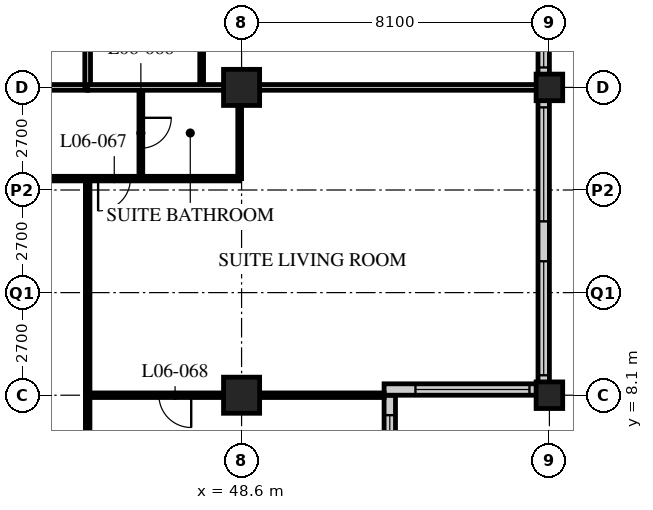
"""IFC4 building model, lengths in metres.
Left out: names, types, materials, properties, quantities, classifications, styles, units other than length and angle.
Written with IfcOpenShell. Run it as: python <this file> out.ifc"""

import sys

from ifc_helpers import new_model, si_unit, direction, frame, frame_2d, origin, origin_2d, place, context, subcontext, project, spatial, rectangle, hollow_rectangle, extrude, element, fill, save


model = new_model("IFC4")
c1 = context("Model", 3, precision=1e-05, world=origin(), true_north=direction((0.0, 1.0)))
c2 = subcontext(c1, "Body", "Model", "MODEL_VIEW")
j1 = project(units=[si_unit("LENGTHUNIT", "METRE"), si_unit("PLANEANGLEUNIT", "RADIAN")], contexts=[c1])
p1 = place(None, origin())
s1 = spatial("IfcSite", under=j1, at=p1, CompositionType="ELEMENT")
p2 = place(p1, origin())
s2 = spatial("IfcBuilding", under=s1, at=p2, CompositionType="ELEMENT")
p3 = place(p2, frame((0.0, 0.0, 33.0)))
s3 = spatial("IfcBuildingStorey", under=s2, at=p3, CompositionType="ELEMENT", Elevation=33.0)
for number, where, z_axis, x_axis in (
    (1, (48.6, 8.1, 0.0), (0.0, 0.0, 1.0), (1.0, 0.0, 0.0)),
    (2, (48.6, 16.2, 0.0), (0.0, 0.0, 1.0), (1.0, 0.0, 0.0)),
):
    element("IfcColumn", number, at=place(p3, frame(where, z_axis=z_axis, x_axis=x_axis)), inside=s3, PredefinedType="COLUMN", context=c2, shape_type="SweptSolid", body=[
        extrude(hollow_rectangle(XDim=0.95, YDim=0.95, WallThickness=0.095, at=origin_2d()), origin(), (0.0, 0.0, 1.0), 3.4),
    ])
for number, where, z_axis, x_axis in (
    (3, (56.7, 8.1, 0.0), (0.0, 0.0, 1.0), (1.0, 0.0, 0.0)),
    (4, (56.7, 16.2, 0.0), (0.0, 0.0, 1.0), (1.0, 0.0, 0.0)),
):
    element("IfcColumn", number, at=place(p3, frame(where, z_axis=z_axis, x_axis=x_axis)), inside=s3, PredefinedType="COLUMN", context=c2, shape_type="SweptSolid", body=[
        extrude(hollow_rectangle(XDim=0.7, YDim=0.7, WallThickness=0.06, at=origin_2d()), origin(), (0.0, 0.0, 1.0), 3.4),
    ])
p4 = place(p3, frame((52.5, 4.35, 0.0), z_axis=(0.0, 0.0, 1.0), x_axis=(0.0, 1.0, 0.0)))
e5 = element("IfcWall", 5, at=p4, inside=s3, PredefinedType="SOLIDWALL", context=c2, shape_type="SweptSolid", body=[
    extrude(rectangle(XDim=3.75, YDim=0.3, at=frame_2d((1.875, 0.0))), origin(), (0.0, 0.0, 1.0), 3.19),
])
p5 = place(p4, frame((0.225, 0.0, 0.9)))
e6 = element("IfcOpeningElement", 6, at=p5, cuts=e5, PredefinedType="OPENING", context=c2, shape_type="SweptSolid", body=[
    extrude(rectangle(XDim=3.0, YDim=1.5, at=frame_2d((1.5, 0.75))), frame((0.0, 0.16, 0.0), z_axis=(0.0, -1.0, 0.0), x_axis=(1.0, 0.0, 0.0)), (0.0, 0.0, 1.0), 0.32),
])
p6 = place(p3, frame((52.35, 8.25, 0.0), z_axis=(0.0, 0.0, 1.0), x_axis=(1.0, 0.0, 0.0)))
e7 = element("IfcWall", 7, at=p6, inside=s3, PredefinedType="SOLIDWALL", context=c2, shape_type="SweptSolid", body=[
    extrude(rectangle(XDim=4.35, YDim=0.3, at=frame_2d((2.175, 0.0))), origin(), (0.0, 0.0, 1.0), 3.19),
])
p7 = place(p6, frame((0.825, 0.0, 0.9)))
e8 = element("IfcOpeningElement", 8, at=p7, cuts=e7, PredefinedType="OPENING", context=c2, shape_type="SweptSolid", body=[
    extrude(rectangle(XDim=3.0, YDim=1.5, at=frame_2d((1.5, 0.75))), frame((0.0, 0.16, 0.0), z_axis=(0.0, -1.0, 0.0), x_axis=(1.0, 0.0, 0.0)), (0.0, 0.0, 1.0), 0.32),
])
p8 = place(p3, frame((56.55, 8.4, 0.0), z_axis=(0.0, 0.0, 1.0), x_axis=(0.0, 1.0, 0.0)))
e9 = element("IfcWall", 9, at=p8, inside=s3, PredefinedType="SOLIDWALL", context=c2, shape_type="SweptSolid", body=[
    extrude(rectangle(XDim=32.1, YDim=0.3, at=frame_2d((16.05, 0.0))), origin(), (0.0, 0.0, 1.0), 3.19),
])
p9 = place(p8, frame((0.225, 0.0, 0.9)))
e10 = element("IfcOpeningElement", 10, at=p9, cuts=e9, PredefinedType="OPENING", context=c2, shape_type="SweptSolid", body=[
    extrude(rectangle(XDim=3.0, YDim=2.0, at=frame_2d((1.5, 1.0))), frame((0.0, 0.16, 0.0), z_axis=(0.0, -1.0, 0.0), x_axis=(1.0, 0.0, 0.0)), (0.0, 0.0, 1.0), 0.32),
])
p10 = place(p8, frame((4.275, 0.0, 0.9)))
e11 = element("IfcOpeningElement", 11, at=p10, cuts=e9, PredefinedType="OPENING", context=c2, shape_type="SweptSolid", body=[
    extrude(rectangle(XDim=3.0, YDim=2.0, at=frame_2d((1.5, 1.0))), frame((0.0, 0.16, 0.0), z_axis=(0.0, -1.0, 0.0), x_axis=(1.0, 0.0, 0.0)), (0.0, 0.0, 1.0), 0.32),
])
p11 = place(p8, frame((8.325, 0.0, 0.9)))
e12 = element("IfcOpeningElement", 12, at=p11, cuts=e9, PredefinedType="OPENING", context=c2, shape_type="SweptSolid", body=[
    extrude(rectangle(XDim=3.0, YDim=2.0, at=frame_2d((1.5, 1.0))), frame((0.0, 0.16, 0.0), z_axis=(0.0, -1.0, 0.0), x_axis=(1.0, 0.0, 0.0)), (0.0, 0.0, 1.0), 0.32),
])
p12 = place(p8, frame((12.375, 0.0, 0.9)))
e13 = element("IfcOpeningElement", 13, at=p12, cuts=e9, PredefinedType="OPENING", context=c2, shape_type="SweptSolid", body=[
    extrude(rectangle(XDim=3.0, YDim=2.0, at=frame_2d((1.5, 1.0))), frame((0.0, 0.16, 0.0), z_axis=(0.0, -1.0, 0.0), x_axis=(1.0, 0.0, 0.0)), (0.0, 0.0, 1.0), 0.32),
])
p13 = place(p8, frame((16.425, 0.0, 0.9)))
e14 = element("IfcOpeningElement", 14, at=p13, cuts=e9, PredefinedType="OPENING", context=c2, shape_type="SweptSolid", body=[
    extrude(rectangle(XDim=3.0, YDim=2.0, at=frame_2d((1.5, 1.0))), frame((0.0, 0.16, 0.0), z_axis=(0.0, -1.0, 0.0), x_axis=(1.0, 0.0, 0.0)), (0.0, 0.0, 1.0), 0.32),
])
p14 = place(p8, frame((20.475, 0.0, 0.9)))
e15 = element("IfcOpeningElement", 15, at=p14, cuts=e9, PredefinedType="OPENING", context=c2, shape_type="SweptSolid", body=[
    extrude(rectangle(XDim=3.0, YDim=2.0, at=frame_2d((1.5, 1.0))), frame((0.0, 0.16, 0.0), z_axis=(0.0, -1.0, 0.0), x_axis=(1.0, 0.0, 0.0)), (0.0, 0.0, 1.0), 0.32),
])
p15 = place(p8, frame((24.525, 0.0, 0.9)))
e16 = element("IfcOpeningElement", 16, at=p15, cuts=e9, PredefinedType="OPENING", context=c2, shape_type="SweptSolid", body=[
    extrude(rectangle(XDim=3.0, YDim=2.0, at=frame_2d((1.5, 1.0))), frame((0.0, 0.16, 0.0), z_axis=(0.0, -1.0, 0.0), x_axis=(1.0, 0.0, 0.0)), (0.0, 0.0, 1.0), 0.32),
])
p16 = place(p8, frame((28.575, 0.0, 0.9)))
e17 = element("IfcOpeningElement", 17, at=p16, cuts=e9, PredefinedType="OPENING", context=c2, shape_type="SweptSolid", body=[
    extrude(rectangle(XDim=3.0, YDim=2.0, at=frame_2d((1.5, 1.0))), frame((0.0, 0.16, 0.0), z_axis=(0.0, -1.0, 0.0), x_axis=(1.0, 0.0, 0.0)), (0.0, 0.0, 1.0), 0.32),
])
p17 = place(p3, frame((12.15, 16.2, 0.0), z_axis=(0.0, 0.0, 1.0), x_axis=(1.0, 0.0, 0.0)))
e18 = element("IfcWall", 18, at=p17, inside=s3, PredefinedType="PARTITIONING", context=c2, shape_type="SweptSolid", body=[
    extrude(rectangle(XDim=32.4, YDim=0.15, at=frame_2d((16.2, 0.0))), origin(), (0.0, 0.0, 1.0), 2.578),
])
p18 = place(p17, frame((6.5, 0.0, 0.0)))
e19 = element("IfcOpeningElement", 19, at=p18, cuts=e18, PredefinedType="OPENING", context=c2, shape_type="SweptSolid", body=[
    extrude(rectangle(XDim=1.0, YDim=2.1, at=frame_2d((0.5, 1.05))), frame((0.0, 0.085, 0.0), z_axis=(0.0, -1.0, 0.0), x_axis=(1.0, 0.0, 0.0)), (0.0, 0.0, 1.0), 0.17),
])
p19 = place(p17, frame((8.4, 0.0, 0.0)))
e20 = element("IfcOpeningElement", 20, at=p19, cuts=e18, PredefinedType="OPENING", context=c2, shape_type="SweptSolid", body=[
    extrude(rectangle(XDim=1.0, YDim=2.1, at=frame_2d((0.5, 1.05))), frame((0.0, 0.085, 0.0), z_axis=(0.0, -1.0, 0.0), x_axis=(1.0, 0.0, 0.0)), (0.0, 0.0, 1.0), 0.17),
])
p20 = place(p17, frame((14.6, 0.0, 0.0)))
e21 = element("IfcOpeningElement", 21, at=p20, cuts=e18, PredefinedType="OPENING", context=c2, shape_type="SweptSolid", body=[
    extrude(rectangle(XDim=1.0, YDim=2.1, at=frame_2d((0.5, 1.05))), frame((0.0, 0.085, 0.0), z_axis=(0.0, -1.0, 0.0), x_axis=(1.0, 0.0, 0.0)), (0.0, 0.0, 1.0), 0.17),
])
p21 = place(p17, frame((16.5, 0.0, 0.0)))
e22 = element("IfcOpeningElement", 22, at=p21, cuts=e18, PredefinedType="OPENING", context=c2, shape_type="SweptSolid", body=[
    extrude(rectangle(XDim=1.0, YDim=2.1, at=frame_2d((0.5, 1.05))), frame((0.0, 0.085, 0.0), z_axis=(0.0, -1.0, 0.0), x_axis=(1.0, 0.0, 0.0)), (0.0, 0.0, 1.0), 0.17),
])
p22 = place(p17, frame((23.0, 0.0, 0.0)))
e23 = element("IfcOpeningElement", 23, at=p22, cuts=e18, PredefinedType="OPENING", context=c2, shape_type="SweptSolid", body=[
    extrude(rectangle(XDim=1.0, YDim=2.1, at=frame_2d((0.5, 1.05))), frame((0.0, 0.085, 0.0), z_axis=(0.0, -1.0, 0.0), x_axis=(1.0, 0.0, 0.0)), (0.0, 0.0, 1.0), 0.17),
])
p23 = place(p17, frame((24.6, 0.0, 0.0)))
e24 = element("IfcOpeningElement", 24, at=p23, cuts=e18, PredefinedType="OPENING", context=c2, shape_type="SweptSolid", body=[
    extrude(rectangle(XDim=1.0, YDim=2.1, at=frame_2d((0.5, 1.05))), frame((0.0, 0.085, 0.0), z_axis=(0.0, -1.0, 0.0), x_axis=(1.0, 0.0, 0.0)), (0.0, 0.0, 1.0), 0.17),
])
p24 = place(p17, frame((1.525, 0.0, 0.0)))
e25 = element("IfcOpeningElement", 25, at=p24, cuts=e18, PredefinedType="OPENING", context=c2, shape_type="SweptSolid", body=[
    extrude(rectangle(XDim=1.0, YDim=2.1, at=frame_2d((0.5, 1.05))), frame((0.0, 0.085, 0.0), z_axis=(0.0, -1.0, 0.0), x_axis=(1.0, 0.0, 0.0)), (0.0, 0.0, 1.0), 0.17),
])
p25 = place(p17, frame((29.875, 0.0, 0.0)))
e26 = element("IfcOpeningElement", 26, at=p25, cuts=e18, PredefinedType="OPENING", context=c2, shape_type="SweptSolid", body=[
    extrude(rectangle(XDim=1.0, YDim=2.1, at=frame_2d((0.5, 1.05))), frame((0.0, 0.085, 0.0), z_axis=(0.0, -1.0, 0.0), x_axis=(1.0, 0.0, 0.0)), (0.0, 0.0, 1.0), 0.17),
])
p26 = place(p3, frame((44.55, 16.2, 0.0), z_axis=(0.0, 0.0, 1.0), x_axis=(0.0, 1.0, 0.0)))
e27 = element("IfcWall", 27, at=p26, inside=s3, PredefinedType="PARTITIONING", context=c2, shape_type="SweptSolid", body=[
    extrude(rectangle(XDim=26.1, YDim=0.15, at=frame_2d((13.05, 0.0))), origin(), (0.0, 0.0, 1.0), 3.19),
])
p27 = place(p26, frame((2.75, 0.0, 0.0)))
e28 = element("IfcOpeningElement", 28, at=p27, cuts=e27, PredefinedType="OPENING", context=c2, shape_type="SweptSolid", body=[
    extrude(rectangle(XDim=1.0, YDim=2.1, at=frame_2d((0.5, 1.05))), frame((0.0, 0.085, 0.0), z_axis=(0.0, -1.0, 0.0), x_axis=(1.0, 0.0, 0.0)), (0.0, 0.0, 1.0), 0.17),
])
p28 = place(p26, frame((4.35, 0.0, 0.0)))
e29 = element("IfcOpeningElement", 29, at=p28, cuts=e27, PredefinedType="OPENING", context=c2, shape_type="SweptSolid", body=[
    extrude(rectangle(XDim=1.0, YDim=2.1, at=frame_2d((0.5, 1.05))), frame((0.0, 0.085, 0.0), z_axis=(0.0, -1.0, 0.0), x_axis=(1.0, 0.0, 0.0)), (0.0, 0.0, 1.0), 0.17),
])
p29 = place(p26, frame((8.4, 0.0, 0.0)))
e30 = element("IfcOpeningElement", 30, at=p29, cuts=e27, PredefinedType="OPENING", context=c2, shape_type="SweptSolid", body=[
    extrude(rectangle(XDim=1.0, YDim=2.1, at=frame_2d((0.5, 1.05))), frame((0.0, 0.085, 0.0), z_axis=(0.0, -1.0, 0.0), x_axis=(1.0, 0.0, 0.0)), (0.0, 0.0, 1.0), 0.17),
])
p30 = place(p26, frame((14.6, 0.0, 0.0)))
e31 = element("IfcOpeningElement", 31, at=p30, cuts=e27, PredefinedType="OPENING", context=c2, shape_type="SweptSolid", body=[
    extrude(rectangle(XDim=1.0, YDim=2.1, at=frame_2d((0.5, 1.05))), frame((0.0, 0.085, 0.0), z_axis=(0.0, -1.0, 0.0), x_axis=(1.0, 0.0, 0.0)), (0.0, 0.0, 1.0), 0.17),
])
p31 = place(p26, frame((18.65, 0.0, 0.0)))
e32 = element("IfcOpeningElement", 32, at=p31, cuts=e27, PredefinedType="OPENING", context=c2, shape_type="SweptSolid", body=[
    extrude(rectangle(XDim=1.0, YDim=2.1, at=frame_2d((0.5, 1.05))), frame((0.0, 0.085, 0.0), z_axis=(0.0, -1.0, 0.0), x_axis=(1.0, 0.0, 0.0)), (0.0, 0.0, 1.0), 0.17),
])
p32 = place(p26, frame((22.65, 0.0, 0.0)))
e33 = element("IfcOpeningElement", 33, at=p32, cuts=e27, PredefinedType="OPENING", context=c2, shape_type="SweptSolid", body=[
    extrude(rectangle(XDim=1.0, YDim=2.1, at=frame_2d((0.5, 1.05))), frame((0.0, 0.085, 0.0), z_axis=(0.0, -1.0, 0.0), x_axis=(1.0, 0.0, 0.0)), (0.0, 0.0, 1.0), 0.17),
])
p33 = place(p3, frame((47.55, 16.2, 0.0), z_axis=(0.0, 0.0, 1.0), x_axis=(0.0, 1.0, 0.0)))
e34 = element("IfcWall", 34, at=p33, inside=s3, PredefinedType="PARTITIONING", context=c2, shape_type="SweptSolid", body=[
    extrude(rectangle(XDim=2.6, YDim=0.1, at=frame_2d((1.3, 0.0))), origin(), (0.0, 0.0, 1.0), 3.19),
])
p34 = place(p3, frame((40.5, 13.8, 0.0), z_axis=(0.0, 0.0, 1.0), x_axis=(1.0, 0.0, 0.0)))
e35 = element("IfcWall", 35, at=p34, inside=s3, PredefinedType="PARTITIONING", context=c2, shape_type="SweptSolid", body=[
    extrude(rectangle(XDim=8.05, YDim=0.12, at=frame_2d((4.025, 0.0))), origin(), (0.0, 0.0, 1.0), 3.19),
])
p35 = place(p34, frame((0.475, 0.0, 0.0)))
e36 = element("IfcOpeningElement", 36, at=p35, cuts=e35, PredefinedType="OPENING", context=c2, shape_type="SweptSolid", body=[
    extrude(rectangle(XDim=0.85, YDim=2.1, at=frame_2d((0.425, 1.05))), frame((0.0, 0.07, 0.0), z_axis=(0.0, -1.0, 0.0), x_axis=(1.0, 0.0, 0.0)), (0.0, 0.0, 1.0), 0.14),
])
p36 = place(p34, frame((4.325, 0.0, 0.0)))
e37 = element("IfcOpeningElement", 37, at=p36, cuts=e35, PredefinedType="OPENING", context=c2, shape_type="SweptSolid", body=[
    extrude(rectangle(XDim=0.85, YDim=2.1, at=frame_2d((0.425, 1.05))), frame((0.0, 0.07, 0.0), z_axis=(0.0, -1.0, 0.0), x_axis=(1.0, 0.0, 0.0)), (0.0, 0.0, 1.0), 0.14),
])
p37 = place(p3, frame((45.95, 16.2, 0.0), z_axis=(0.0, 0.0, 1.0), x_axis=(0.0, -1.0, 0.0)))
e38 = element("IfcWall", 38, at=p37, inside=s3, PredefinedType="PARTITIONING", context=c2, shape_type="SweptSolid", body=[
    extrude(rectangle(XDim=2.4, YDim=0.1, at=frame_2d((1.2, 0.0))), origin(), (0.0, 0.0, 1.0), 3.19),
])
p38 = place(p37, frame((0.8, 0.0, 0.0)))
e39 = element("IfcOpeningElement", 39, at=p38, cuts=e38, PredefinedType="OPENING", context=c2, shape_type="SweptSolid", body=[
    extrude(rectangle(XDim=0.8, YDim=2.1, at=frame_2d((0.4, 1.05))), frame((0.0, 0.06, 0.0), z_axis=(0.0, -1.0, 0.0), x_axis=(1.0, 0.0, 0.0)), (0.0, 0.0, 1.0), 0.12),
])
p39 = place(p3, frame((48.55, 16.2, 0.0), z_axis=(0.0, 0.0, 1.0), x_axis=(0.0, -1.0, 0.0)))
e40 = element("IfcWall", 40, at=p39, inside=s3, PredefinedType="PARTITIONING", context=c2, shape_type="SweptSolid", body=[
    extrude(rectangle(XDim=2.4, YDim=0.1, at=frame_2d((1.2, 0.0))), origin(), (0.0, 0.0, 1.0), 2.578),
])
p40 = place(p3, frame((44.55, 13.8, 0.0), z_axis=(0.0, 0.0, 1.0), x_axis=(0.0, -1.0, 0.0)))
e41 = element("IfcWall", 41, at=p40, inside=s3, PredefinedType="PARTITIONING", context=c2, shape_type="SweptSolid", body=[
    extrude(rectangle(XDim=13.5, YDim=0.12, at=frame_2d((6.75, 0.0))), origin(), (0.0, 0.0, 1.0), 3.19),
])
p41 = place(p3, frame((44.55, 8.1, 0.0), z_axis=(0.0, 0.0, 1.0), x_axis=(1.0, 0.0, 0.0)))
e42 = element("IfcWall", 42, at=p41, inside=s3, PredefinedType="PARTITIONING", context=c2, shape_type="SweptSolid", body=[
    extrude(rectangle(XDim=7.8, YDim=0.12, at=frame_2d((3.9, 0.0))), origin(), (0.0, 0.0, 1.0), 2.578),
])
p42 = place(p41, frame((1.875, 0.0, 0.0)))
e43 = element("IfcOpeningElement", 43, at=p42, cuts=e42, PredefinedType="OPENING", context=c2, shape_type="SweptSolid", body=[
    extrude(rectangle(XDim=0.85, YDim=2.1, at=frame_2d((0.425, 1.05))), frame((0.0, 0.07, 0.0), z_axis=(0.0, -1.0, 0.0), x_axis=(1.0, 0.0, 0.0)), (0.0, 0.0, 1.0), 0.14),
])
p43 = place(p3, frame((44.55, 16.2, 0.0), z_axis=(0.0, 0.0, 1.0), x_axis=(1.0, 0.0, 0.0)))
e44 = element("IfcWall", 44, at=p43, inside=s3, PredefinedType="PARTITIONING", context=c2, shape_type="SweptSolid", body=[
    extrude(rectangle(XDim=11.85, YDim=0.15, at=frame_2d((5.925, 0.0))), origin(), (0.0, 0.0, 1.0), 2.578),
])
p44 = place(p5, origin())
e45 = element("IfcWindow", 45, at=p44, inside=s3, PartitioningType="SINGLE_PANEL", PredefinedType="WINDOW", context=c2, shape_type="SweptSolid", body=[
    extrude(rectangle(XDim=3.0, YDim=1.5, at=frame_2d((1.5, 0.75))), frame((0.0, 0.03, 0.0), z_axis=(0.0, -1.0, 0.0), x_axis=(1.0, 0.0, 0.0)), (0.0, 0.0, 1.0), 0.06),
])
fill(e6, e45)
p45 = place(p7, origin())
e46 = element("IfcWindow", 46, at=p45, inside=s3, PartitioningType="SINGLE_PANEL", PredefinedType="WINDOW", context=c2, shape_type="SweptSolid", body=[
    extrude(rectangle(XDim=3.0, YDim=1.5, at=frame_2d((1.5, 0.75))), frame((0.0, 0.03, 0.0), z_axis=(0.0, -1.0, 0.0), x_axis=(1.0, 0.0, 0.0)), (0.0, 0.0, 1.0), 0.06),
])
fill(e8, e46)
p46 = place(p9, origin())
e47 = element("IfcWindow", 47, at=p46, inside=s3, PartitioningType="SINGLE_PANEL", PredefinedType="WINDOW", context=c2, shape_type="SweptSolid", body=[
    extrude(rectangle(XDim=3.0, YDim=2.0, at=frame_2d((1.5, 1.0))), frame((0.0, 0.03, 0.0), z_axis=(0.0, -1.0, 0.0), x_axis=(1.0, 0.0, 0.0)), (0.0, 0.0, 1.0), 0.06),
])
fill(e10, e47)
p47 = place(p10, origin())
e48 = element("IfcWindow", 48, at=p47, inside=s3, PartitioningType="SINGLE_PANEL", PredefinedType="WINDOW", context=c2, shape_type="SweptSolid", body=[
    extrude(rectangle(XDim=3.0, YDim=2.0, at=frame_2d((1.5, 1.0))), frame((0.0, 0.03, 0.0), z_axis=(0.0, -1.0, 0.0), x_axis=(1.0, 0.0, 0.0)), (0.0, 0.0, 1.0), 0.06),
])
fill(e11, e48)
p48 = place(p11, origin())
e49 = element("IfcWindow", 49, at=p48, inside=s3, PartitioningType="SINGLE_PANEL", PredefinedType="WINDOW", context=c2, shape_type="SweptSolid", body=[
    extrude(rectangle(XDim=3.0, YDim=2.0, at=frame_2d((1.5, 1.0))), frame((0.0, 0.03, 0.0), z_axis=(0.0, -1.0, 0.0), x_axis=(1.0, 0.0, 0.0)), (0.0, 0.0, 1.0), 0.06),
])
fill(e12, e49)
p49 = place(p38, origin())
e50 = element("IfcDoor", 50, at=p49, inside=s3, OperationType="SINGLE_SWING_LEFT", PredefinedType="DOOR", context=c2, shape_type="SweptSolid", body=[
    extrude(rectangle(XDim=0.8, YDim=2.1, at=frame_2d((0.4, 1.05))), frame((0.0, 0.025, 0.0), z_axis=(0.0, -1.0, 0.0), x_axis=(1.0, 0.0, 0.0)), (0.0, 0.0, 1.0), 0.05),
])
fill(e39, e50)
p50 = place(p36, origin())
e51 = element("IfcDoor", 51, at=p50, inside=s3, OperationType="SINGLE_SWING_RIGHT", PredefinedType="DOOR", context=c2, shape_type="SweptSolid", body=[
    extrude(rectangle(XDim=0.85, YDim=2.1, at=frame_2d((0.425, 1.05))), frame((0.0, 0.025, 0.0), z_axis=(0.0, -1.0, 0.0), x_axis=(1.0, 0.0, 0.0)), (0.0, 0.0, 1.0), 0.05),
])
fill(e37, e51)
p51 = place(p42, origin())
e52 = element("IfcDoor", 52, at=p51, inside=s3, OperationType="SINGLE_SWING_LEFT", PredefinedType="DOOR", context=c2, shape_type="SweptSolid", body=[
    extrude(rectangle(XDim=0.85, YDim=2.1, at=frame_2d((0.425, 1.05))), frame((0.0, 0.025, 0.0), z_axis=(0.0, -1.0, 0.0), x_axis=(1.0, 0.0, 0.0)), (0.0, 0.0, 1.0), 0.05),
])
fill(e43, e52)
save(model, sys.argv[1])
